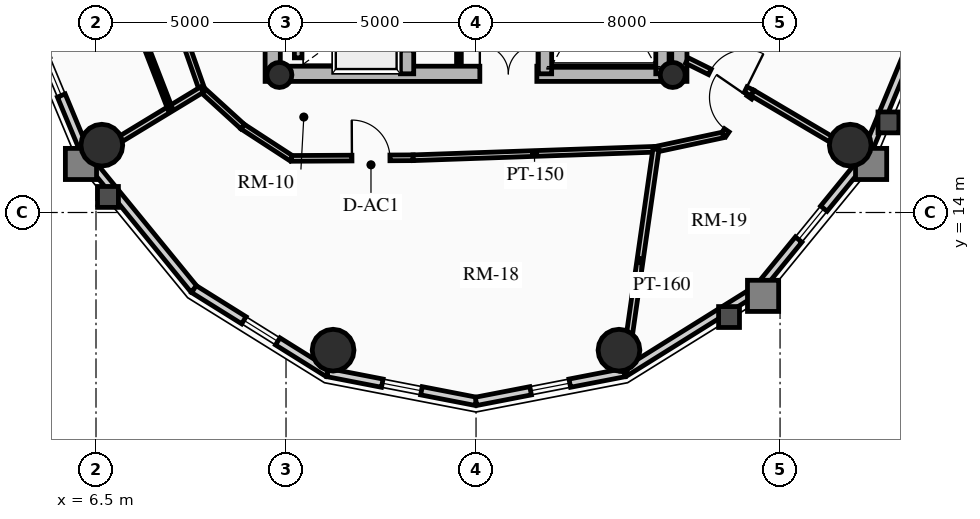
"""IFC4 building model, lengths in metres.
Left out: names, types, materials, properties, quantities, classifications, styles, units other than length and angle.
Written with IfcOpenShell. Run it as: python <this file> out.ifc"""

import sys

from ifc_helpers import new_model, si_unit, direction, frame, frame_2d, origin, origin_2d, place, context, subcontext, project, spatial, rectangle, circle, hollow_circle, extrude, source, transform, mapped, element, fill, save


model = new_model("IFC4")
c1 = context("Model", 3, precision=1e-05, world=origin(), true_north=direction((0.0, 1.0)))
c2 = subcontext(c1, "Body", "Model", "MODEL_VIEW")
j1 = project(units=[si_unit("LENGTHUNIT", "METRE"), si_unit("PLANEANGLEUNIT", "RADIAN")], contexts=[c1])
p1 = place(None, origin())
s1 = spatial("IfcSite", under=j1, at=p1, CompositionType="ELEMENT")
p2 = place(p1, origin())
s2 = spatial("IfcBuilding", under=s1, at=p2, CompositionType="ELEMENT")
p3 = place(p2, frame((0.0, 0.0, 219.94)))
s3 = spatial("IfcBuildingStorey", under=s2, at=p3, CompositionType="ELEMENT", Elevation=219.94)
for number, where, z_axis, x_axis in (
    (1, (11.15, 17.45, 0.0), (0.0, 0.0, 1.0), (0.0, 1.0, 0.0)),
    (2, (21.85, 17.45, 0.0), (0.0, 0.0, 1.0), (0.0, 1.0, 0.0)),
):
    element("IfcWall", number, at=place(p3, frame(where, z_axis=z_axis, x_axis=x_axis)), inside=s3, PredefinedType="SHEAR", context=c2, shape_type="SweptSolid", body=[
        extrude(rectangle(XDim=14.1, YDim=0.4, at=frame_2d((7.05, 0.0))), origin(), (0.0, 0.0, 1.0), 2.91),
    ])
p4 = place(p3, frame((11.15, 17.65, 0.0), z_axis=(0.0, 0.0, 1.0), x_axis=(1.0, 0.0, 0.0)))
e3 = element("IfcWall", 3, at=p4, inside=s3, PredefinedType="SHEAR", context=c2, shape_type="SweptSolid", body=[
    extrude(rectangle(XDim=10.7, YDim=0.4, at=frame_2d((5.35, 0.0))), origin(), (0.0, 0.0, 1.0), 2.91),
])
m1 = source(origin(), c2, "Body", "SweptSolid", [
    extrude(rectangle(XDim=1.5, YDim=2.02, at=frame_2d((0.75, 1.01))), frame((0.0, 0.21, 0.0), z_axis=(0.0, -1.0, 0.0), x_axis=(1.0, 0.0, 0.0)), (0.0, 0.0, 1.0), 0.42),
])
p5 = place(p4, frame((5.45, 0.0, 0.0)))
e4 = element("IfcOpeningElement", 4, at=p5, cuts=e3, PredefinedType="OPENING", context=c2, shape_type="MappedRepresentation", body=[
    mapped(m1, transform((0.0, 0.0, 0.0), x_axis=(1.0, 0.0, 0.0), y_axis=(0.0, 1.0, 0.0), z_axis=(0.0, 0.0, 1.0), scale=1.0)),
])
p6 = place(p3, frame((14.685, 17.65, 0.0), z_axis=(0.0, 0.0, 1.0), x_axis=(0.0, 1.0, 0.0)))
e5 = element("IfcWall", 5, at=p6, inside=s3, PredefinedType="SHEAR", context=c2, shape_type="SweptSolid", body=[
    extrude(rectangle(XDim=13.7, YDim=0.35, at=frame_2d((6.85, 0.0))), origin(), (0.0, 0.0, 1.0), 2.91),
])
m2 = source(origin(), c2, "Body", "SweptSolid", [
    extrude(rectangle(XDim=1.1, YDim=2.015, at=frame_2d((0.55, 1.007))), frame((0.0, 0.185, 0.0), z_axis=(0.0, -1.0, 0.0), x_axis=(1.0, 0.0, 0.0)), (0.0, 0.0, 1.0), 0.37),
])
p7 = place(p6, frame((4.85, 0.0, 0.0)))
e6 = element("IfcOpeningElement", 6, at=p7, cuts=e5, PredefinedType="OPENING", context=c2, shape_type="MappedRepresentation", body=[
    mapped(m2, transform((0.0, 0.0, 0.0), x_axis=(1.0, 0.0, 0.0), y_axis=(0.0, 1.0, 0.0), z_axis=(0.0, 0.0, 1.0), scale=1.0)),
])
p8 = place(p6, frame((0.625, 0.0, 0.0)))
e7 = element("IfcOpeningElement", 7, at=p8, cuts=e5, PredefinedType="OPENING", context=c2, shape_type="MappedRepresentation", body=[
    mapped(m2, transform((0.0, 0.0, 0.0), x_axis=(1.0, 0.0, 0.0), y_axis=(0.0, 1.0, 0.0), z_axis=(0.0, 0.0, 1.0), scale=1.0)),
])
p9 = place(p6, frame((2.625, 0.0, 0.0)))
e8 = element("IfcOpeningElement", 8, at=p9, cuts=e5, PredefinedType="OPENING", context=c2, shape_type="MappedRepresentation", body=[
    mapped(m2, transform((0.0, 0.0, 0.0), x_axis=(1.0, 0.0, 0.0), y_axis=(0.0, 1.0, 0.0), z_axis=(0.0, 0.0, 1.0), scale=1.0)),
])
m3 = source(origin(), c2, "Body", "SweptSolid", [
    extrude(rectangle(XDim=1.15, YDim=2.02, at=frame_2d((0.575, 1.01))), frame((0.0, 0.185, 0.0), z_axis=(0.0, -1.0, 0.0), x_axis=(1.0, 0.0, 0.0)), (0.0, 0.0, 1.0), 0.37),
])
p10 = place(p6, frame((7.27, 0.0, 0.0)))
e9 = element("IfcOpeningElement", 9, at=p10, cuts=e5, PredefinedType="OPENING", context=c2, shape_type="MappedRepresentation", body=[
    mapped(m3, transform((0.0, 0.0, 0.0), x_axis=(1.0, 0.0, 0.0), y_axis=(0.0, 1.0, 0.0), z_axis=(0.0, 0.0, 1.0), scale=1.0)),
])
p11 = place(p3, frame((18.315, 17.65, 0.0), z_axis=(0.0, 0.0, 1.0), x_axis=(0.0, 1.0, 0.0)))
e10 = element("IfcWall", 10, at=p11, inside=s3, PredefinedType="SHEAR", context=c2, shape_type="SweptSolid", body=[
    extrude(rectangle(XDim=9.6, YDim=0.35, at=frame_2d((4.8, 0.0))), origin(), (0.0, 0.0, 1.0), 2.91),
])
p12 = place(p11, frame((5.28, 0.0, 0.0)))
e11 = element("IfcOpeningElement", 11, at=p12, cuts=e10, PredefinedType="OPENING", context=c2, shape_type="MappedRepresentation", body=[
    mapped(m3, transform((0.0, 0.0, 0.0), x_axis=(1.0, 0.0, 0.0), y_axis=(0.0, 1.0, 0.0), z_axis=(0.0, 0.0, 1.0), scale=1.0)),
])
p13 = place(p3, frame((21.405, 17.65, 0.0), z_axis=(0.0, 0.0, 1.0), x_axis=(0.0, 1.0, 0.0)))
e12 = element("IfcWall", 12, at=p13, inside=s3, PredefinedType="SHEAR", context=c2, shape_type="SweptSolid", body=[
    extrude(rectangle(XDim=6.695, YDim=0.35, at=frame_2d((3.348, 0.0))), origin(), (0.0, 0.0, 1.0), 2.91),
])
for number, where, z_axis, x_axis in (
    (13, (11.325, 17.62, 0.0), (0.0, 0.0, 1.0), (1.0, 0.0, 0.0)),
    (14, (21.675, 17.62, 0.0), (0.0, 0.0, 1.0), (1.0, 0.0, 0.0)),
):
    element("IfcColumn", number, at=place(p3, frame(where, z_axis=z_axis, x_axis=x_axis)), inside=s3, PredefinedType="COLUMN", context=c2, shape_type="SweptSolid", body=[
        extrude(hollow_circle(Radius=0.33, WallThickness=0.025, at=origin_2d()), origin(), (0.0, 0.0, 1.0), 2.91),
    ])
for number, where, z_axis, x_axis in (
    (15, (6.653, 15.771, 0.0), (0.0, 0.0, 1.0), (1.0, 0.0, 0.0)),
    (16, (12.739, 10.377, 0.0), (0.0, 0.0, 1.0), (1.0, 0.0, 0.0)),
    (17, (20.261, 10.377, 0.0), (0.0, 0.0, 1.0), (1.0, 0.0, 0.0)),
    (18, (26.347, 15.771, 0.0), (0.0, 0.0, 1.0), (1.0, 0.0, 0.0)),
):
    element("IfcColumn", number, at=place(p3, frame(where, z_axis=z_axis, x_axis=x_axis)), inside=s3, PredefinedType="USERDEFINED", context=c2, shape_type="SweptSolid", body=[
        extrude(circle(Radius=0.55, at=origin_2d()), origin(), (0.0, 0.0, 1.0), 2.91),
    ])
p14 = place(p3, frame((6.282, 15.407, 0.0), z_axis=(0.0, 0.0, 1.0), x_axis=(-0.384036305194, 0.923317993052, 0.0)))
e19 = element("IfcWall", 19, at=p14, inside=s3, PredefinedType="SOLIDWALL", context=c2, shape_type="SweptSolid", body=[
    extrude(rectangle(XDim=4.671, YDim=0.22, at=frame_2d((2.335, 0.0))), origin(), (0.0, 0.0, 1.0), 2.322),
])
m4 = source(origin(), c2, "Body", "SweptSolid", [
    extrude(rectangle(XDim=1.05, YDim=1.3, at=frame_2d((0.525, 0.65))), frame((0.0, 0.12, 0.0), z_axis=(0.0, -1.0, 0.0), x_axis=(1.0, 0.0, 0.0)), (0.0, 0.0, 1.0), 0.24),
])
p15 = place(p14, frame((1.81, 0.0, 0.65)))
e20 = element("IfcOpeningElement", 20, at=p15, cuts=e19, PredefinedType="OPENING", context=c2, shape_type="MappedRepresentation", body=[
    mapped(m4, transform((0.0, 0.0, 0.0), x_axis=(1.0, 0.0, 0.0), y_axis=(0.0, 1.0, 0.0), z_axis=(0.0, 0.0, 1.0), scale=1.0)),
])
p16 = place(p3, frame((9.076, 11.985, 0.0), z_axis=(0.0, 0.0, 1.0), x_axis=(-0.632467166636, 0.774587169483, 0.0)))
e21 = element("IfcWall", 21, at=p16, inside=s3, PredefinedType="SOLIDWALL", context=c2, shape_type="SweptSolid", body=[
    extrude(rectangle(XDim=4.418, YDim=0.22, at=frame_2d((2.209, 0.0))), origin(), (0.0, 0.0, 1.0), 2.322),
])
p17 = place(p3, frame((12.597, 9.787, 0.0), z_axis=(0.0, 0.0, 1.0), x_axis=(-0.848318713376, 0.529485939886, 0.0)))
e22 = element("IfcWall", 22, at=p17, inside=s3, PredefinedType="SOLIDWALL", context=c2, shape_type="SweptSolid", body=[
    extrude(rectangle(XDim=4.15, YDim=0.22, at=frame_2d((2.075, 0.0))), origin(), (0.0, 0.0, 1.0), 2.322),
])
p18 = place(p17, frame((1.55, 0.0, 0.65)))
e23 = element("IfcOpeningElement", 23, at=p18, cuts=e22, PredefinedType="OPENING", context=c2, shape_type="MappedRepresentation", body=[
    mapped(m4, transform((0.0, 0.0, 0.0), x_axis=(1.0, 0.0, 0.0), y_axis=(0.0, 1.0, 0.0), z_axis=(0.0, 0.0, 1.0), scale=1.0)),
])
p19 = place(p3, frame((16.5, 9.03, 0.0), z_axis=(0.0, 0.0, 1.0), x_axis=(-0.981700307484, 0.190432419211, 0.0)))
e24 = element("IfcWall", 24, at=p19, inside=s3, PredefinedType="SOLIDWALL", context=c2, shape_type="SweptSolid", body=[
    extrude(rectangle(XDim=3.976, YDim=0.22, at=frame_2d((1.988, 0.0))), origin(), (0.0, 0.0, 1.0), 2.322),
])
p20 = place(p19, frame((1.463, 0.0, 0.65)))
e25 = element("IfcOpeningElement", 25, at=p20, cuts=e24, PredefinedType="OPENING", context=c2, shape_type="MappedRepresentation", body=[
    mapped(m4, transform((0.0, 0.0, 0.0), x_axis=(1.0, 0.0, 0.0), y_axis=(0.0, 1.0, 0.0), z_axis=(0.0, 0.0, 1.0), scale=1.0)),
])
p21 = place(p3, frame((20.403, 9.787, 0.0), z_axis=(0.0, 0.0, 1.0), x_axis=(-0.981700307484, -0.190432419211, 0.0)))
e26 = element("IfcWall", 26, at=p21, inside=s3, PredefinedType="SOLIDWALL", context=c2, shape_type="SweptSolid", body=[
    extrude(rectangle(XDim=3.976, YDim=0.22, at=frame_2d((1.988, 0.0))), origin(), (0.0, 0.0, 1.0), 2.322),
])
p22 = place(p21, frame((1.463, 0.0, 0.65)))
e27 = element("IfcOpeningElement", 27, at=p22, cuts=e26, PredefinedType="OPENING", context=c2, shape_type="MappedRepresentation", body=[
    mapped(m4, transform((0.0, 0.0, 0.0), x_axis=(1.0, 0.0, 0.0), y_axis=(0.0, 1.0, 0.0), z_axis=(0.0, 0.0, 1.0), scale=1.0)),
])
p23 = place(p3, frame((23.924, 11.985, 0.0), z_axis=(0.0, 0.0, 1.0), x_axis=(-0.848318713376, -0.529485939886, 0.0)))
e28 = element("IfcWall", 28, at=p23, inside=s3, PredefinedType="SOLIDWALL", context=c2, shape_type="SweptSolid", body=[
    extrude(rectangle(XDim=4.15, YDim=0.22, at=frame_2d((2.075, 0.0))), origin(), (0.0, 0.0, 1.0), 2.322),
])
p24 = place(p3, frame((26.718, 15.407, 0.0), z_axis=(0.0, 0.0, 1.0), x_axis=(-0.632467166636, -0.774587169483, 0.0)))
e29 = element("IfcWall", 29, at=p24, inside=s3, PredefinedType="SOLIDWALL", context=c2, shape_type="SweptSolid", body=[
    extrude(rectangle(XDim=4.418, YDim=0.22, at=frame_2d((2.209, 0.0))), origin(), (0.0, 0.0, 1.0), 2.322),
])
p25 = place(p24, frame((1.684, 0.0, 0.65)))
e30 = element("IfcOpeningElement", 30, at=p25, cuts=e29, PredefinedType="OPENING", context=c2, shape_type="MappedRepresentation", body=[
    mapped(m4, transform((0.0, 0.0, 0.0), x_axis=(1.0, 0.0, 0.0), y_axis=(0.0, 1.0, 0.0), z_axis=(0.0, 0.0, 1.0), scale=1.0)),
])
p26 = place(p3, frame((28.512, 19.719, 0.0), z_axis=(0.0, 0.0, 1.0), x_axis=(-0.384036305194, -0.923317993052, 0.0)))
e31 = element("IfcWall", 31, at=p26, inside=s3, PredefinedType="SOLIDWALL", context=c2, shape_type="SweptSolid", body=[
    extrude(rectangle(XDim=4.671, YDim=0.22, at=frame_2d((2.335, 0.0))), origin(), (0.0, 0.0, 1.0), 2.322),
])
p27 = place(p3, frame((11.82, 18.07, 0.0), z_axis=(0.0, 0.0, 1.0), x_axis=(0.0, 1.0, 0.0)))
e32 = element("IfcWall", 32, at=p27, inside=s3, PredefinedType="SHEAR", context=c2, shape_type="SweptSolid", body=[
    extrude(rectangle(XDim=1.635, YDim=0.2, at=frame_2d((0.817, 0.0))), origin(), (0.0, 0.0, 1.0), 2.91),
])
p28 = place(p3, frame((16.05, 17.92, 0.0), z_axis=(0.0, 0.0, 1.0), x_axis=(0.0, 1.0, 0.0)))
e33 = element("IfcWall", 33, at=p28, inside=s3, PredefinedType="PARTITIONING", context=c2, shape_type="SweptSolid", body=[
    extrude(rectangle(XDim=3.08, YDim=0.125, at=frame_2d((1.54, 0.0))), origin(), (0.0, 0.0, 1.0), 2.685),
])
m5 = source(origin(), c2, "Body", "SweptSolid", [
    extrude(rectangle(XDim=0.9, YDim=2.005, at=frame_2d((0.45, 1.002))), frame((0.0, 0.073, 0.0), z_axis=(0.0, -1.0, 0.0), x_axis=(1.0, 0.0, 0.0)), (0.0, 0.0, 1.0), 0.145),
])
p29 = place(p28, frame((1.05, 0.0, 0.0)))
e34 = element("IfcOpeningElement", 34, at=p29, cuts=e33, PredefinedType="OPENING", context=c2, shape_type="MappedRepresentation", body=[
    mapped(m5, transform((0.0, 0.0, 0.0), x_axis=(1.0, 0.0, 0.0), y_axis=(0.0, 1.0, 0.0), z_axis=(0.0, 0.0, 1.0), scale=1.0)),
])
p30 = place(p3, frame((8.832, 18.534, 0.0), z_axis=(0.0, 0.0, 1.0), x_axis=(0.332031819657, -0.943268186008, 0.0)))
e35 = element("IfcWall", 35, at=p30, inside=s3, PredefinedType="PARTITIONING", context=c2, shape_type="SweptSolid", body=[
    extrude(rectangle(XDim=1.377, YDim=0.15, at=frame_2d((0.688, 0.0))), origin(), (0.0, 0.0, 1.0), 2.255),
])
p31 = place(p3, frame((9.289, 17.235, 0.0), z_axis=(0.0, 0.0, 1.0), x_axis=(0.739015164946, -0.673688790155, 0.0)))
e36 = element("IfcWall", 36, at=p31, inside=s3, PredefinedType="PARTITIONING", context=c2, shape_type="SweptSolid", body=[
    extrude(rectangle(XDim=1.446, YDim=0.15, at=frame_2d((0.723, 0.0))), origin(), (0.0, 0.0, 1.0), 2.322),
])
p32 = place(p3, frame((10.358, 16.26, 0.0), z_axis=(0.0, 0.0, 1.0), x_axis=(0.838265397059, -0.545262435983, 0.0)))
e37 = element("IfcWall", 37, at=p32, inside=s3, PredefinedType="PARTITIONING", context=c2, shape_type="SweptSolid", body=[
    extrude(rectangle(XDim=1.534, YDim=0.15, at=frame_2d((0.767, 0.0))), origin(), (0.0, 0.0, 1.0), 2.255),
])
p33 = place(p3, frame((11.644, 15.424, 0.0), z_axis=(0.0, 0.0, 1.0), x_axis=(0.999986552511, 0.005186019339, 0.0)))
e38 = element("IfcWall", 38, at=p33, inside=s3, PredefinedType="PARTITIONING", context=c2, shape_type="SweptSolid", body=[
    extrude(rectangle(XDim=3.201, YDim=0.15, at=frame_2d((1.601, 0.0))), origin(), (0.0, 0.0, 1.0), 2.322),
])
m6 = source(origin(), c2, "Body", "SweptSolid", [
    extrude(rectangle(XDim=1.0, YDim=2.015, at=frame_2d((0.5, 1.007))), frame((0.0, 0.085, 0.0), z_axis=(0.0, -1.0, 0.0), x_axis=(1.0, 0.0, 0.0)), (0.0, 0.0, 1.0), 0.17),
])
p34 = place(p33, frame((1.591, 0.0, 0.0)))
e39 = element("IfcOpeningElement", 39, at=p34, cuts=e38, PredefinedType="OPENING", context=c2, shape_type="MappedRepresentation", body=[
    mapped(m6, transform((0.0, 0.0, 0.0), x_axis=(1.0, 0.0, 0.0), y_axis=(0.0, 1.0, 0.0), z_axis=(0.0, 0.0, 1.0), scale=1.0)),
])
p35 = place(p3, frame((14.845, 15.441, 0.0), z_axis=(0.0, 0.0, 1.0), x_axis=(0.99938794868, 0.034981824334, 0.0)))
e40 = element("IfcWall", 40, at=p35, inside=s3, PredefinedType="PARTITIONING", context=c2, shape_type="SweptSolid", body=[
    extrude(rectangle(XDim=6.393, YDim=0.15, at=frame_2d((3.196, 0.0))), origin(), (0.0, 0.0, 1.0), 2.255),
])
p36 = place(p3, frame((21.234, 15.664, 0.0), z_axis=(0.0, 0.0, 1.0), x_axis=(0.977931581182, 0.208925399431, 0.0)))
e41 = element("IfcWall", 41, at=p36, inside=s3, PredefinedType="PARTITIONING", context=c2, shape_type="SweptSolid", body=[
    extrude(rectangle(XDim=1.823, YDim=0.15, at=frame_2d((0.912, 0.0))), origin(), (0.0, 0.0, 1.0), 2.255),
])
p37 = place(p3, frame((23.017, 16.045, 0.0), z_axis=(0.0, 0.0, 1.0), x_axis=(0.566660656138, 0.823951273308, 0.0)))
e42 = element("IfcWall", 42, at=p37, inside=s3, PredefinedType="PARTITIONING", context=c2, shape_type="SweptSolid", body=[
    extrude(rectangle(XDim=1.336, YDim=0.15, at=frame_2d((0.668, 0.0))), origin(), (0.0, 0.0, 1.0), 2.322),
])
m7 = source(origin(), c2, "Body", "SweptSolid", [
    extrude(rectangle(XDim=1.05, YDim=2.015, at=frame_2d((0.525, 1.007))), frame((0.0, 0.085, 0.0), z_axis=(0.0, -1.0, 0.0), x_axis=(1.0, 0.0, 0.0)), (0.0, 0.0, 1.0), 0.17),
])
p38 = place(p37, frame((0.143, 0.0, 0.0)))
e43 = element("IfcOpeningElement", 43, at=p38, cuts=e42, PredefinedType="OPENING", context=c2, shape_type="MappedRepresentation", body=[
    mapped(m7, transform((0.0, 0.0, 0.0), x_axis=(1.0, 0.0, 0.0), y_axis=(0.0, 1.0, 0.0), z_axis=(0.0, 0.0, 1.0), scale=1.0)),
])
p39 = place(p3, frame((9.289, 17.235, 0.0), z_axis=(0.0, 0.0, 1.0), x_axis=(-0.854741081983, -0.519054604806, 0.0)))
e44 = element("IfcWall", 44, at=p39, inside=s3, PredefinedType="PARTITIONING", context=c2, shape_type="SweptSolid", body=[
    extrude(rectangle(XDim=3.499, YDim=0.16, at=frame_2d((1.75, 0.0))), origin(), (0.0, 0.0, 1.0), 2.322),
])
p40 = place(p3, frame((21.234, 15.664, 0.0), z_axis=(0.0, 0.0, 1.0), x_axis=(-0.141467563045, -0.989942891588, 0.0)))
e45 = element("IfcWall", 45, at=p40, inside=s3, PredefinedType="PARTITIONING", context=c2, shape_type="SweptSolid", body=[
    extrude(rectangle(XDim=5.918, YDim=0.16, at=frame_2d((2.959, 0.0))), origin(), (0.0, 0.0, 1.0), 2.322),
])
p41 = place(p3, frame((23.774, 17.146, 0.0), z_axis=(0.0, 0.0, 1.0), x_axis=(0.861296601099, -0.508102514198, 0.0)))
e46 = element("IfcWall", 46, at=p41, inside=s3, PredefinedType="PARTITIONING", context=c2, shape_type="SweptSolid", body=[
    extrude(rectangle(XDim=3.399, YDim=0.16, at=frame_2d((1.7, 0.0))), origin(), (0.0, 0.0, 1.0), 2.322),
])
p42 = place(p3, frame((22.05, 18.0, 0.0), z_axis=(0.0, 0.0, 1.0), x_axis=(0.896045848613, -0.443961526692, 0.0)))
e47 = element("IfcWall", 47, at=p42, inside=s3, PredefinedType="PARTITIONING", context=c2, shape_type="SweptSolid", body=[
    extrude(rectangle(XDim=1.924, YDim=0.16, at=frame_2d((0.962, 0.0))), origin(), (0.0, 0.0, 1.0), 2.255),
])
m8 = source(origin(), c2, "Body", "SweptSolid", [
    extrude(rectangle(XDim=1.05, YDim=2.015, at=frame_2d((0.525, 1.007))), frame((0.0, 0.09, 0.0), z_axis=(0.0, -1.0, 0.0), x_axis=(1.0, 0.0, 0.0)), (0.0, 0.0, 1.0), 0.18),
])
p43 = place(p42, frame((0.674, 0.0, 0.0)))
e48 = element("IfcOpeningElement", 48, at=p43, cuts=e47, PredefinedType="OPENING", context=c2, shape_type="MappedRepresentation", body=[
    mapped(m8, transform((0.0, 0.0, 0.0), x_axis=(1.0, 0.0, 0.0), y_axis=(0.0, 1.0, 0.0), z_axis=(0.0, 0.0, 1.0), scale=1.0)),
])
p44 = place(p3, frame((7.621, 18.868, 0.0), z_axis=(0.0, 0.0, 1.0), x_axis=(0.361712646649, -0.93228963378, 0.0)))
e49 = element("IfcWall", 49, at=p44, inside=s3, PredefinedType="PARTITIONING", context=c2, shape_type="SweptSolid", body=[
    extrude(rectangle(XDim=2.297, YDim=0.125, at=frame_2d((1.148, 0.0))), origin(), (0.0, 0.0, 1.0), 2.255),
])
m9 = source(origin(), c2, "Body", "SweptSolid", [
    extrude(rectangle(XDim=1.05, YDim=1.3, at=frame_2d((0.525, 0.65))), frame((0.0, 0.03, 0.0), z_axis=(0.0, -1.0, 0.0), x_axis=(1.0, 0.0, 0.0)), (0.0, 0.0, 1.0), 0.06),
])
p45 = place(p15, origin())
e50 = element("IfcWindow", 50, at=p45, inside=s3, PartitioningType="SINGLE_PANEL", PredefinedType="WINDOW", context=c2, shape_type="MappedRepresentation", body=[
    mapped(m9, transform((0.0, 0.0, 0.0), x_axis=(1.0, 0.0, 0.0), y_axis=(0.0, 1.0, 0.0), z_axis=(0.0, 0.0, 1.0), scale=1.0)),
])
fill(e20, e50)
p46 = place(p18, origin())
e51 = element("IfcWindow", 51, at=p46, inside=s3, PartitioningType="SINGLE_PANEL", PredefinedType="WINDOW", context=c2, shape_type="MappedRepresentation", body=[
    mapped(m9, transform((0.0, 0.0, 0.0), x_axis=(1.0, 0.0, 0.0), y_axis=(0.0, 1.0, 0.0), z_axis=(0.0, 0.0, 1.0), scale=1.0)),
])
fill(e23, e51)
p47 = place(p20, origin())
e52 = element("IfcWindow", 52, at=p47, inside=s3, PartitioningType="SINGLE_PANEL", PredefinedType="WINDOW", context=c2, shape_type="MappedRepresentation", body=[
    mapped(m9, transform((0.0, 0.0, 0.0), x_axis=(1.0, 0.0, 0.0), y_axis=(0.0, 1.0, 0.0), z_axis=(0.0, 0.0, 1.0), scale=1.0)),
])
fill(e25, e52)
p48 = place(p22, origin())
e53 = element("IfcWindow", 53, at=p48, inside=s3, PartitioningType="SINGLE_PANEL", PredefinedType="WINDOW", context=c2, shape_type="MappedRepresentation", body=[
    mapped(m9, transform((0.0, 0.0, 0.0), x_axis=(1.0, 0.0, 0.0), y_axis=(0.0, 1.0, 0.0), z_axis=(0.0, 0.0, 1.0), scale=1.0)),
])
fill(e27, e53)
p49 = place(p25, origin())
e54 = element("IfcWindow", 54, at=p49, inside=s3, PartitioningType="SINGLE_PANEL", PredefinedType="WINDOW", context=c2, shape_type="MappedRepresentation", body=[
    mapped(m9, transform((0.0, 0.0, 0.0), x_axis=(1.0, 0.0, 0.0), y_axis=(0.0, 1.0, 0.0), z_axis=(0.0, 0.0, 1.0), scale=1.0)),
])
fill(e30, e54)
m10 = source(origin(), c2, "Body", "SweptSolid", [
    extrude(rectangle(XDim=1.5, YDim=2.02, at=frame_2d((0.75, 1.01))), frame((0.0, 0.025, 0.0), z_axis=(0.0, -1.0, 0.0), x_axis=(1.0, 0.0, 0.0)), (0.0, 0.0, 1.0), 0.05),
])
p50 = place(p5, origin())
e55 = element("IfcDoor", 55, at=p50, inside=s3, OperationType="DOUBLE_DOOR_SINGLE_SWING", PredefinedType="DOOR", context=c2, shape_type="MappedRepresentation", body=[
    mapped(m10, transform((0.0, 0.0, 0.0), x_axis=(1.0, 0.0, 0.0), y_axis=(0.0, 1.0, 0.0), z_axis=(0.0, 0.0, 1.0), scale=1.0)),
])
fill(e4, e55)
m11 = source(origin(), c2, "Body", "SweptSolid", [
    extrude(rectangle(XDim=1.05, YDim=2.015, at=frame_2d((0.525, 1.007))), frame((0.0, 0.025, 0.0), z_axis=(0.0, -1.0, 0.0), x_axis=(1.0, 0.0, 0.0)), (0.0, 0.0, 1.0), 0.05),
])
p51 = place(p43, origin())
e56 = element("IfcDoor", 56, at=p51, inside=s3, OperationType="SINGLE_SWING_RIGHT", PredefinedType="DOOR", context=c2, shape_type="MappedRepresentation", body=[
    mapped(m11, transform((0.0, 0.0, 0.0), x_axis=(1.0, 0.0, 0.0), y_axis=(0.0, 1.0, 0.0), z_axis=(0.0, 0.0, 1.0), scale=1.0)),
])
fill(e48, e56)
m12 = source(origin(), c2, "Body", "SweptSolid", [
    extrude(rectangle(XDim=1.0, YDim=2.015, at=frame_2d((0.5, 1.007))), frame((0.0, 0.025, 0.0), z_axis=(0.0, -1.0, 0.0), x_axis=(1.0, 0.0, 0.0)), (0.0, 0.0, 1.0), 0.05),
])
p52 = place(p34, origin())
e57 = element("IfcDoor", 57, at=p52, inside=s3, OperationType="SINGLE_SWING_LEFT", PredefinedType="DOOR", context=c2, shape_type="MappedRepresentation", body=[
    mapped(m12, transform((0.0, 0.0, 0.0), x_axis=(1.0, 0.0, 0.0), y_axis=(0.0, 1.0, 0.0), z_axis=(0.0, 0.0, 1.0), scale=1.0)),
])
fill(e39, e57)
p53 = place(p38, origin())
e58 = element("IfcDoor", 58, at=p53, inside=s3, OperationType="SINGLE_SWING_RIGHT", PredefinedType="DOOR", context=c2, shape_type="MappedRepresentation", body=[
    mapped(m11, transform((0.0, 0.0, 0.0), x_axis=(1.0, 0.0, 0.0), y_axis=(0.0, 1.0, 0.0), z_axis=(0.0, 0.0, 1.0), scale=1.0)),
])
fill(e43, e58)
save(model, sys.argv[1])
